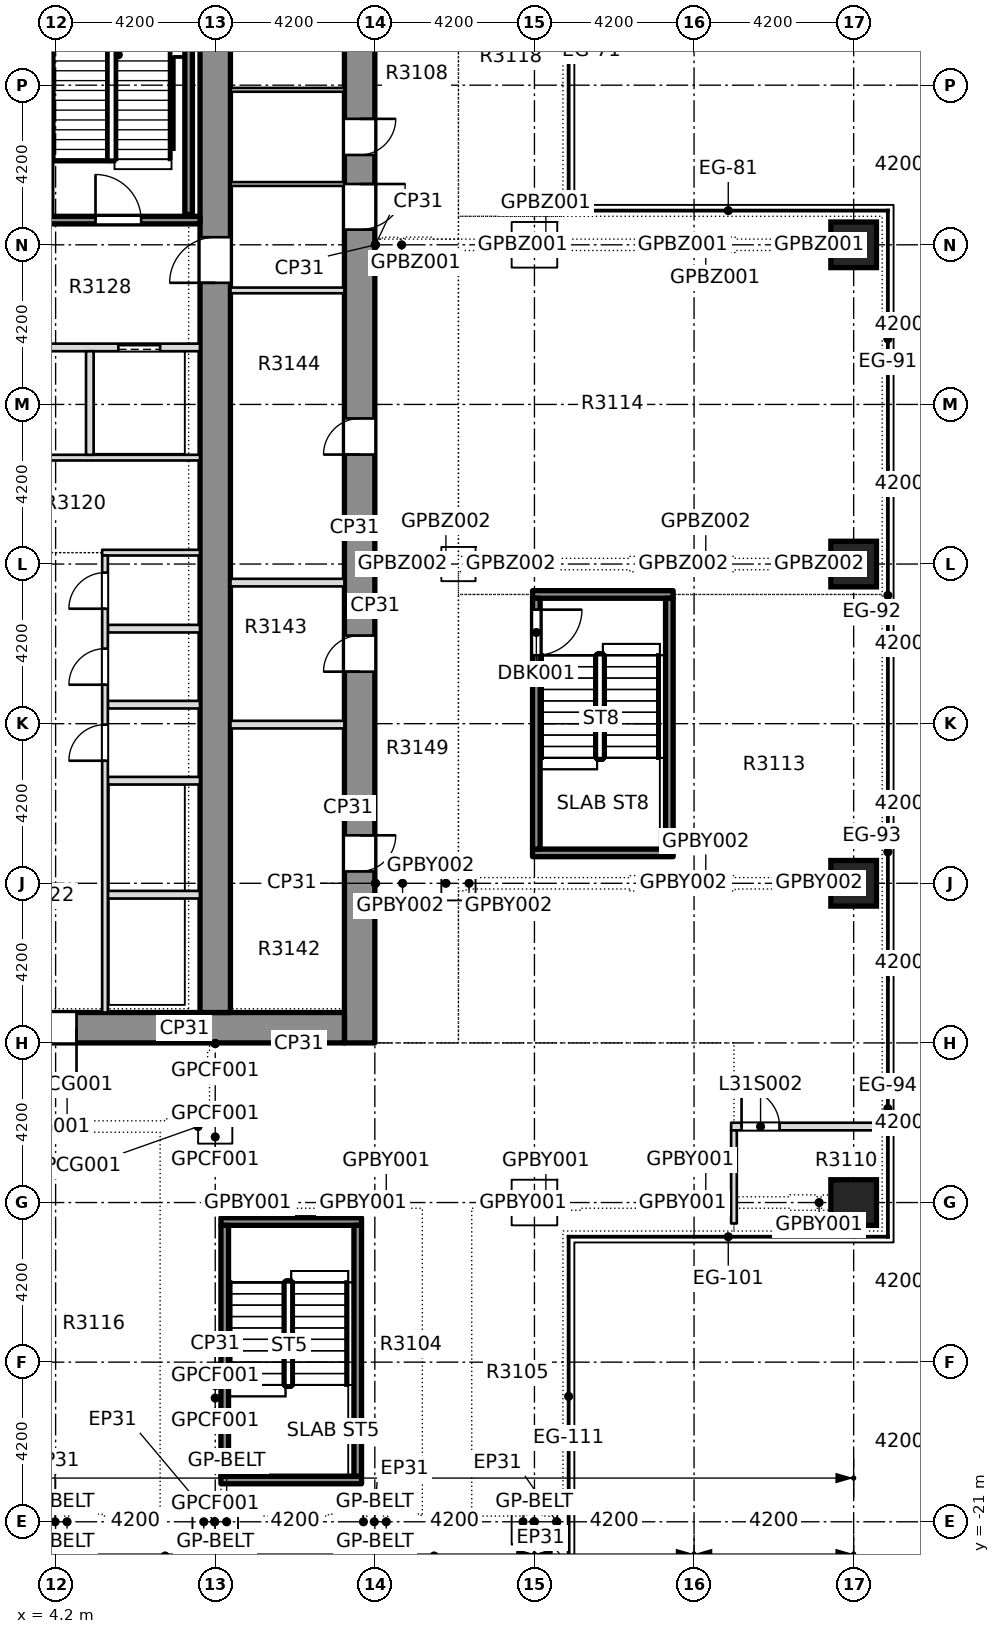
"""IFC4 building model, lengths in metres.
Left out: names, types, materials, properties, quantities, classifications, styles, units other than length and angle.
Written with IfcOpenShell. Run it as: python <this file> out.ifc"""

import sys

from ifc_helpers import new_model, si_unit, direction, frame, frame_2d, origin, origin_2d, place, context, subcontext, project, spatial, rectangle, extrude, element, fill, save


model = new_model("IFC4")
c1 = context("Model", 3, precision=1e-05, world=origin(), true_north=direction((0.0, 1.0)))
c2 = subcontext(c1, "Body", "Model", "MODEL_VIEW")
j1 = project(units=[si_unit("LENGTHUNIT", "METRE"), si_unit("PLANEANGLEUNIT", "RADIAN")], contexts=[c1])
p1 = place(None, origin())
s1 = spatial("IfcSite", under=j1, at=p1, CompositionType="ELEMENT")
p2 = place(p1, origin())
s2 = spatial("IfcBuilding", under=s1, at=p2, CompositionType="ELEMENT")
p3 = place(p2, frame((0.0, 0.0, 121.8)))
s3 = spatial("IfcBuildingStorey", under=s2, at=p3, CompositionType="ELEMENT", Elevation=121.8)
p4 = place(p3, frame((12.2, -8.4, 0.0), z_axis=(0.0, 0.0, 1.0), x_axis=(0.0, 1.0, 0.0)))
e1 = element("IfcWall", 1, at=p4, inside=s3, PredefinedType="SHEAR", context=c2, shape_type="SweptSolid", body=[
    extrude(rectangle(XDim=30.15, YDim=0.8, at=frame_2d((15.075, 0.0))), origin(), (0.0, 0.0, 1.0), 6.1),
])
p5 = place(p4, frame((4.512, 0.0, 0.0)))
e2 = element("IfcOpeningElement", 2, at=p5, cuts=e1, PredefinedType="OPENING", context=c2, shape_type="SweptSolid", body=[
    extrude(rectangle(XDim=0.95, YDim=2.1, at=frame_2d((0.475, 1.05))), frame((0.0, 0.41, 0.0), z_axis=(0.0, -1.0, 0.0), x_axis=(1.0, 0.0, 0.0)), (0.0, 0.0, 1.0), 0.82),
])
p6 = place(p4, frame((9.768, 0.0, 0.0)))
e3 = element("IfcOpeningElement", 3, at=p6, cuts=e1, PredefinedType="OPENING", context=c2, shape_type="SweptSolid", body=[
    extrude(rectangle(XDim=0.95, YDim=2.1, at=frame_2d((0.475, 1.05))), frame((0.0, 0.41, 0.0), z_axis=(0.0, -1.0, 0.0), x_axis=(1.0, 0.0, 0.0)), (0.0, 0.0, 1.0), 0.82),
])
p7 = place(p4, frame((15.481, 0.0, 0.0)))
e4 = element("IfcOpeningElement", 4, at=p7, cuts=e1, PredefinedType="OPENING", context=c2, shape_type="SweptSolid", body=[
    extrude(rectangle(XDim=0.95, YDim=2.1, at=frame_2d((0.475, 1.05))), frame((0.0, 0.41, 0.0), z_axis=(0.0, -1.0, 0.0), x_axis=(1.0, 0.0, 0.0)), (0.0, 0.0, 1.0), 0.82),
])
p8 = place(p4, frame((23.364, 0.0, 0.0)))
e5 = element("IfcOpeningElement", 5, at=p8, cuts=e1, PredefinedType="OPENING", context=c2, shape_type="SweptSolid", body=[
    extrude(rectangle(XDim=0.95, YDim=2.1, at=frame_2d((0.475, 1.05))), frame((0.0, 0.41, 0.0), z_axis=(0.0, -1.0, 0.0), x_axis=(1.0, 0.0, 0.0)), (0.0, 0.0, 1.0), 0.82),
])
p9 = place(p4, frame((26.689, 0.0, 0.0)))
e6 = element("IfcOpeningElement", 6, at=p9, cuts=e1, PredefinedType="OPENING", context=c2, shape_type="SweptSolid", body=[
    extrude(rectangle(XDim=0.95, YDim=2.1, at=frame_2d((0.475, 1.05))), frame((0.0, 0.41, 0.0), z_axis=(0.0, -1.0, 0.0), x_axis=(1.0, 0.0, 0.0)), (0.0, 0.0, 1.0), 0.82),
])
p10 = place(p4, frame((21.4, 0.0, 0.0)))
e7 = element("IfcOpeningElement", 7, at=p10, cuts=e1, PredefinedType="OPENING", context=c2, shape_type="SweptSolid", body=[
    extrude(rectangle(XDim=1.2, YDim=2.1, at=frame_2d((0.6, 1.05))), frame((0.0, 0.41, 0.0), z_axis=(0.0, -1.0, 0.0), x_axis=(1.0, 0.0, 0.0)), (0.0, 0.0, 1.0), 0.82),
])
p11 = place(p3, frame((-11.8, -8.0, 0.0), z_axis=(0.0, 0.0, 1.0), x_axis=(1.0, 0.0, 0.0)))
e8 = element("IfcWall", 8, at=p11, inside=s3, PredefinedType="SHEAR", context=c2, shape_type="SweptSolid", body=[
    extrude(rectangle(XDim=23.6, YDim=0.8, at=frame_2d((11.8, 0.0))), origin(), (0.0, 0.0, 1.0), 6.1),
])
p12 = place(p11, frame((7.05, 0.0, 0.0)))
e9 = element("IfcOpeningElement", 9, at=p12, cuts=e8, PredefinedType="OPENING", context=c2, shape_type="SweptSolid", body=[
    extrude(rectangle(XDim=1.8, YDim=2.1, at=frame_2d((0.9, 1.05))), frame((0.0, 0.41, 0.0), z_axis=(0.0, -1.0, 0.0), x_axis=(1.0, 0.0, 0.0)), (0.0, 0.0, 1.0), 0.82),
])
p13 = place(p11, frame((14.75, 0.0, 0.0)))
e10 = element("IfcOpeningElement", 10, at=p13, cuts=e8, PredefinedType="OPENING", context=c2, shape_type="SweptSolid", body=[
    extrude(rectangle(XDim=1.8, YDim=2.1, at=frame_2d((0.9, 1.05))), frame((0.0, 0.41, 0.0), z_axis=(0.0, -1.0, 0.0), x_axis=(1.0, 0.0, 0.0)), (0.0, 0.0, 1.0), 0.82),
])
p14 = place(p3, frame((8.4, -7.6, 0.0), z_axis=(0.0, 0.0, 1.0), x_axis=(0.0, 1.0, 0.0)))
e11 = element("IfcWall", 11, at=p14, inside=s3, PredefinedType="SHEAR", context=c2, shape_type="SweptSolid", body=[
    extrude(rectangle(XDim=28.55, YDim=0.8, at=frame_2d((14.275, 0.0))), origin(), (0.0, 0.0, 1.0), 6.1),
])
p15 = place(p14, frame((19.2, 0.0, 0.0)))
e12 = element("IfcOpeningElement", 12, at=p15, cuts=e11, PredefinedType="OPENING", context=c2, shape_type="SweptSolid", body=[
    extrude(rectangle(XDim=1.2, YDim=2.1, at=frame_2d((0.6, 1.05))), frame((0.0, 0.41, 0.0), z_axis=(0.0, -1.0, 0.0), x_axis=(1.0, 0.0, 0.0)), (0.0, 0.0, 1.0), 0.82),
])
for number, where, z_axis, x_axis in (
    (13, (25.2, -12.6, -0.45), (0.0, 0.0, 1.0), (1.0, 0.0, 0.0)),
    (14, (25.2, -4.2, -0.45), (0.0, 0.0, 1.0), (1.0, 0.0, 0.0)),
    (15, (25.2, 4.2, -0.45), (0.0, 0.0, 1.0), (1.0, 0.0, 0.0)),
    (16, (25.2, 12.6, -0.45), (0.0, 0.0, 1.0), (1.0, 0.0, 0.0)),
):
    element("IfcColumn", number, at=place(p3, frame(where, z_axis=z_axis, x_axis=x_axis)), inside=s3, PredefinedType="COLUMN", context=c2, shape_type="SweptSolid", body=[
        extrude(rectangle(XDim=1.2, YDim=1.2, at=origin_2d()), origin(), (0.0, 0.0, 1.0), 6.55),
    ])
p16 = place(p3, frame((21.975, -10.6, 0.0), z_axis=(0.0, 0.0, 1.0), x_axis=(1.0, 0.0, 0.0)))
e17 = element("IfcWall", 17, at=p16, inside=s3, PredefinedType="PARTITIONING", context=c2, shape_type="SweptSolid", body=[
    extrude(rectangle(XDim=3.775, YDim=0.2, at=frame_2d((1.887, 0.0))), origin(), (0.0, 0.0, 1.0), 6.1),
])
p17 = place(p16, frame((0.275, 0.0, 0.0)))
e18 = element("IfcOpeningElement", 18, at=p17, cuts=e17, PredefinedType="OPENING", context=c2, shape_type="SweptSolid", body=[
    extrude(rectangle(XDim=1.0, YDim=2.1, at=frame_2d((0.5, 1.05))), frame((0.0, 0.11, 0.0), z_axis=(0.0, -1.0, 0.0), x_axis=(1.0, 0.0, 0.0)), (0.0, 0.0, 1.0), 0.22),
])
p18 = place(p3, frame((22.05, -13.15, 0.0), z_axis=(0.0, 0.0, 1.0), x_axis=(0.0, 1.0, 0.0)))
e19 = element("IfcWall", 19, at=p18, inside=s3, PredefinedType="PARTITIONING", context=c2, shape_type="SweptSolid", body=[
    extrude(rectangle(XDim=2.45, YDim=0.15, at=frame_2d((1.225, 0.0))), origin(), (0.0, 0.0, 1.0), 6.1),
])
for number, where, z_axis, x_axis in (
    (20, (5.575, -4.5, 0.0), (0.0, 0.0, 1.0), (1.0, 0.0, 0.0)),
    (21, (5.575, -1.5, 0.0), (0.0, 0.0, 1.0), (1.0, 0.0, 0.0)),
    (22, (5.575, 0.5, 0.0), (0.0, 0.0, 1.0), (1.0, 0.0, 0.0)),
    (23, (5.575, 2.5, 0.0), (0.0, 0.0, 1.0), (1.0, 0.0, 0.0)),
):
    element("IfcWall", number, at=place(p3, frame(where, z_axis=z_axis, x_axis=x_axis)), inside=s3, PredefinedType="PARTITIONING", context=c2, shape_type="SweptSolid", body=[
        extrude(rectangle(XDim=2.424, YDim=0.2, at=frame_2d((1.212, 0.0))), origin(), (0.0, 0.0, 1.0), 6.1),
    ])
p19 = place(p3, frame((5.425, 4.5, 0.0), z_axis=(0.0, 0.0, 1.0), x_axis=(1.0, 0.0, 0.0)))
e24 = element("IfcWall", 24, at=p19, inside=s3, PredefinedType="PARTITIONING", context=c2, shape_type="SweptSolid", body=[
    extrude(rectangle(XDim=2.574, YDim=0.15, at=frame_2d((1.287, 0.0))), origin(), (0.0, 0.0, 1.0), 6.1),
])
p20 = place(p3, frame((-7.999, 7.0, 0.0), z_axis=(0.0, 0.0, 1.0), x_axis=(1.0, 0.0, 0.0)))
e25 = element("IfcWall", 25, at=p20, inside=s3, PredefinedType="PARTITIONING", context=c2, shape_type="SweptSolid", body=[
    extrude(rectangle(XDim=15.998, YDim=0.15, at=frame_2d((7.999, 0.0))), origin(), (0.0, 0.0, 1.0), 6.1),
])
p21 = place(p20, frame((7.299, 0.0, 0.0)))
e26 = element("IfcOpeningElement", 26, at=p21, cuts=e25, PredefinedType="OPENING", context=c2, shape_type="SweptSolid", body=[
    extrude(rectangle(XDim=1.4, YDim=2.1, at=frame_2d((0.7, 1.05))), frame((0.0, 0.085, 0.0), z_axis=(0.0, -1.0, 0.0), x_axis=(1.0, 0.0, 0.0)), (0.0, 0.0, 1.0), 0.17),
])
p22 = place(p3, frame((3.6, 9.9, 0.0), z_axis=(0.0, 0.0, 1.0), x_axis=(1.0, 0.0, 0.0)))
e27 = element("IfcWall", 27, at=p22, inside=s3, PredefinedType="PARTITIONING", context=c2, shape_type="SweptSolid", body=[
    extrude(rectangle(XDim=4.399, YDim=0.2, at=frame_2d((2.199, 0.0))), origin(), (0.0, 0.0, 1.0), 6.1),
])
p23 = place(p22, frame((2.25, 0.0, 0.0)))
e28 = element("IfcOpeningElement", 28, at=p23, cuts=e27, PredefinedType="OPENING", context=c2, shape_type="SweptSolid", body=[
    extrude(rectangle(XDim=1.1, YDim=2.1, at=frame_2d((0.55, 1.05))), frame((0.0, 0.11, 0.0), z_axis=(0.0, -1.0, 0.0), x_axis=(1.0, 0.0, 0.0)), (0.0, 0.0, 1.0), 0.22),
])
p24 = place(p3, frame((3.425, 13.25, 0.0), z_axis=(0.0, 0.0, 1.0), x_axis=(1.0, 0.0, 0.0)))
e29 = element("IfcWall", 29, at=p24, inside=s3, PredefinedType="SOLIDWALL", context=c2, shape_type="SweptSolid", body=[
    extrude(rectangle(XDim=4.574, YDim=0.2, at=frame_2d((2.287, 0.0))), origin(), (0.0, 0.0, 1.0), 6.1),
])
p25 = place(p24, frame((1.825, 0.0, 0.0)))
e30 = element("IfcOpeningElement", 30, at=p25, cuts=e29, PredefinedType="OPENING", context=c2, shape_type="SweptSolid", body=[
    extrude(rectangle(XDim=1.2, YDim=2.1, at=frame_2d((0.6, 1.05))), frame((0.0, 0.11, 0.0), z_axis=(0.0, -1.0, 0.0), x_axis=(1.0, 0.0, 0.0)), (0.0, 0.0, 1.0), 0.22),
])
p26 = place(p3, frame((5.1, 7.075, 0.0), z_axis=(0.0, 0.0, 1.0), x_axis=(0.0, 1.0, 0.0)))
e31 = element("IfcWall", 31, at=p26, inside=s3, PredefinedType="PARTITIONING", context=c2, shape_type="SweptSolid", body=[
    extrude(rectangle(XDim=2.725, YDim=0.2, at=frame_2d((1.363, 0.0))), origin(), (0.0, 0.0, 1.0), 6.1),
])
p27 = place(p3, frame((5.5, -7.599, 0.0), z_axis=(0.0, 0.0, 1.0), x_axis=(0.0, 1.0, 0.0)))
e32 = element("IfcWall", 32, at=p27, inside=s3, PredefinedType="PARTITIONING", context=c2, shape_type="SweptSolid", body=[
    extrude(rectangle(XDim=12.024, YDim=0.15, at=frame_2d((6.012, 0.0))), origin(), (0.0, 0.0, 1.0), 6.1),
])
p28 = place(p27, frame((6.624, 0.0, 0.0)))
e33 = element("IfcOpeningElement", 33, at=p28, cuts=e32, PredefinedType="OPENING", context=c2, shape_type="SweptSolid", body=[
    extrude(rectangle(XDim=0.95, YDim=2.1, at=frame_2d((0.475, 1.05))), frame((0.0, 0.085, 0.0), z_axis=(0.0, -1.0, 0.0), x_axis=(1.0, 0.0, 0.0)), (0.0, 0.0, 1.0), 0.17),
])
p29 = place(p27, frame((8.624, 0.0, 0.0)))
e34 = element("IfcOpeningElement", 34, at=p29, cuts=e32, PredefinedType="OPENING", context=c2, shape_type="SweptSolid", body=[
    extrude(rectangle(XDim=0.95, YDim=2.1, at=frame_2d((0.475, 1.05))), frame((0.0, 0.085, 0.0), z_axis=(0.0, -1.0, 0.0), x_axis=(1.0, 0.0, 0.0)), (0.0, 0.0, 1.0), 0.17),
])
p30 = place(p27, frame((10.624, 0.0, 0.0)))
e35 = element("IfcOpeningElement", 35, at=p30, cuts=e32, PredefinedType="OPENING", context=c2, shape_type="SweptSolid", body=[
    extrude(rectangle(XDim=0.95, YDim=2.1, at=frame_2d((0.475, 1.05))), frame((0.0, 0.085, 0.0), z_axis=(0.0, -1.0, 0.0), x_axis=(1.0, 0.0, 0.0)), (0.0, 0.0, 1.0), 0.17),
])
for number, where, z_axis, x_axis in (
    (36, (8.801, -0.025, 0.0), (0.0, 0.0, 1.0), (1.0, 0.0, 0.0)),
    (37, (8.801, 3.712, 0.0), (0.0, 0.0, 1.0), (1.0, 0.0, 0.0)),
):
    element("IfcWall", number, at=place(p3, frame(where, z_axis=z_axis, x_axis=x_axis)), inside=s3, PredefinedType="PARTITIONING", context=c2, shape_type="SweptSolid", body=[
        extrude(rectangle(XDim=2.998, YDim=0.2, at=frame_2d((1.499, 0.0))), origin(), (0.0, 0.0, 1.0), 6.1),
    ])
p31 = place(p3, frame((8.801, 11.4, 0.0), z_axis=(0.0, 0.0, 1.0), x_axis=(1.0, 0.0, 0.0)))
e38 = element("IfcWall", 38, at=p31, inside=s3, PredefinedType="PARTITIONING", context=c2, shape_type="SweptSolid", body=[
    extrude(rectangle(XDim=2.998, YDim=0.15, at=frame_2d((1.499, 0.0))), origin(), (0.0, 0.0, 1.0), 6.1),
])
for number, where, z_axis, x_axis in (
    (39, (8.801, 14.2, 0.0), (0.0, 0.0, 1.0), (1.0, 0.0, 0.0)),
    (40, (8.801, 16.678, 0.0), (0.0, 0.0, 1.0), (1.0, 0.0, 0.0)),
):
    element("IfcWall", number, at=place(p3, frame(where, z_axis=z_axis, x_axis=x_axis)), inside=s3, PredefinedType="PARTITIONING", context=c2, shape_type="SweptSolid", body=[
        extrude(rectangle(XDim=2.998, YDim=0.1, at=frame_2d((1.499, 0.0))), origin(), (0.0, 0.0, 1.0), 6.1),
    ])
for number, where, z_axis, x_axis in (
    (41, (8.55, -19.9, 0.0), (0.0, 0.0, 1.0), (1.0, 0.0, 0.0)),
    (42, (8.55, -13.1, 0.0), (0.0, 0.0, 1.0), (1.0, 0.0, 0.0)),
):
    element("IfcWall", number, at=place(p3, frame(where, z_axis=z_axis, x_axis=x_axis)), inside=s3, PredefinedType="SOLIDWALL", context=c2, shape_type="SweptSolid", body=[
        extrude(rectangle(XDim=3.7, YDim=0.2, at=frame_2d((1.85, 0.0))), origin(), (0.0, 0.0, 1.0), 6.1),
    ])
for number, where, z_axis, x_axis in (
    (43, (8.65, -19.8, 0.0), (0.0, 0.0, 1.0), (0.0, 1.0, 0.0)),
    (44, (12.15, -19.8, 0.0), (0.0, 0.0, 1.0), (0.0, 1.0, 0.0)),
):
    element("IfcWall", number, at=place(p3, frame(where, z_axis=z_axis, x_axis=x_axis)), inside=s3, PredefinedType="SOLIDWALL", context=c2, shape_type="SweptSolid", body=[
        extrude(rectangle(XDim=6.6, YDim=0.2, at=frame_2d((3.3, 0.0))), origin(), (0.0, 0.0, 1.0), 6.1),
    ])
for number, where, z_axis, x_axis in (
    (45, (16.75, -3.4, 0.0), (0.0, 0.0, 1.0), (1.0, 0.0, 0.0)),
    (46, (16.75, 3.4, 0.0), (0.0, 0.0, 1.0), (1.0, 0.0, 0.0)),
):
    element("IfcWall", number, at=place(p3, frame(where, z_axis=z_axis, x_axis=x_axis)), inside=s3, PredefinedType="SOLIDWALL", context=c2, shape_type="SweptSolid", body=[
        extrude(rectangle(XDim=3.7, YDim=0.2, at=frame_2d((1.85, 0.0))), origin(), (0.0, 0.0, 1.0), 6.1),
    ])
p32 = place(p3, frame((16.85, -3.3, 0.0), z_axis=(0.0, 0.0, 1.0), x_axis=(0.0, 1.0, 0.0)))
e47 = element("IfcWall", 47, at=p32, inside=s3, PredefinedType="SOLIDWALL", context=c2, shape_type="SweptSolid", body=[
    extrude(rectangle(XDim=6.6, YDim=0.2, at=frame_2d((3.3, 0.0))), origin(), (0.0, 0.0, 1.0), 6.1),
])
p33 = place(p32, frame((5.1, 0.0, 0.0)))
e48 = element("IfcOpeningElement", 48, at=p33, cuts=e47, PredefinedType="OPENING", context=c2, shape_type="SweptSolid", body=[
    extrude(rectangle(XDim=1.2, YDim=2.1, at=frame_2d((0.6, 1.05))), frame((0.0, 0.11, 0.0), z_axis=(0.0, -1.0, 0.0), x_axis=(1.0, 0.0, 0.0)), (0.0, 0.0, 1.0), 0.22),
])
p34 = place(p3, frame((20.35, -3.3, 0.0), z_axis=(0.0, 0.0, 1.0), x_axis=(0.0, 1.0, 0.0)))
e49 = element("IfcWall", 49, at=p34, inside=s3, PredefinedType="SOLIDWALL", context=c2, shape_type="SweptSolid", body=[
    extrude(rectangle(XDim=6.6, YDim=0.2, at=frame_2d((3.3, 0.0))), origin(), (0.0, 0.0, 1.0), 6.1),
])
p35 = place(p3, frame((7.7, 13.4, 0.0), z_axis=(0.0, 0.0, 1.0), x_axis=(0.0, 1.0, 0.0)))
e50 = element("IfcWall", 50, at=p35, inside=s3, PredefinedType="SOLIDWALL", context=c2, shape_type="SweptSolid", body=[
    extrude(rectangle(XDim=7.45, YDim=0.2, at=frame_2d((3.725, 0.0))), origin(), (0.0, 0.0, 1.0), 6.1),
])
p36 = place(p17, origin())
e51 = element("IfcDoor", 51, at=p36, inside=s3, OperationType="SINGLE_SWING_RIGHT", PredefinedType="DOOR", context=c2, shape_type="SweptSolid", body=[
    extrude(rectangle(XDim=1.0, YDim=2.1, at=frame_2d((0.5, 1.05))), frame((0.0, 0.025, 0.0), z_axis=(0.0, -1.0, 0.0), x_axis=(1.0, 0.0, 0.0)), (0.0, 0.0, 1.0), 0.05),
])
fill(e18, e51)
p37 = place(p28, origin())
e52 = element("IfcDoor", 52, at=p37, inside=s3, OperationType="SINGLE_SWING_RIGHT", PredefinedType="DOOR", context=c2, shape_type="SweptSolid", body=[
    extrude(rectangle(XDim=0.95, YDim=2.1, at=frame_2d((0.475, 1.05))), frame((0.0, 0.025, 0.0), z_axis=(0.0, -1.0, 0.0), x_axis=(1.0, 0.0, 0.0)), (0.0, 0.0, 1.0), 0.05),
])
fill(e33, e52)
p38 = place(p29, origin())
e53 = element("IfcDoor", 53, at=p38, inside=s3, OperationType="SINGLE_SWING_LEFT", PredefinedType="DOOR", context=c2, shape_type="SweptSolid", body=[
    extrude(rectangle(XDim=0.95, YDim=2.1, at=frame_2d((0.475, 1.05))), frame((0.0, 0.025, 0.0), z_axis=(0.0, -1.0, 0.0), x_axis=(1.0, 0.0, 0.0)), (0.0, 0.0, 1.0), 0.05),
])
fill(e34, e53)
p39 = place(p30, origin())
e54 = element("IfcDoor", 54, at=p39, inside=s3, OperationType="SINGLE_SWING_RIGHT", PredefinedType="DOOR", context=c2, shape_type="SweptSolid", body=[
    extrude(rectangle(XDim=0.95, YDim=2.1, at=frame_2d((0.475, 1.05))), frame((0.0, 0.025, 0.0), z_axis=(0.0, -1.0, 0.0), x_axis=(1.0, 0.0, 0.0)), (0.0, 0.0, 1.0), 0.05),
])
fill(e35, e54)
p40 = place(p25, origin())
e55 = element("IfcDoor", 55, at=p40, inside=s3, OperationType="SINGLE_SWING_RIGHT", PredefinedType="DOOR", context=c2, shape_type="SweptSolid", body=[
    extrude(rectangle(XDim=1.2, YDim=2.1, at=frame_2d((0.6, 1.05))), frame((0.0, 0.025, 0.0), z_axis=(0.0, -1.0, 0.0), x_axis=(1.0, 0.0, 0.0)), (0.0, 0.0, 1.0), 0.05),
])
fill(e30, e55)
p41 = place(p23, origin())
e56 = element("IfcDoor", 56, at=p41, inside=s3, OperationType="SLIDING_TO_LEFT", PredefinedType="DOOR", context=c2, shape_type="SweptSolid", body=[
    extrude(rectangle(XDim=1.1, YDim=2.1, at=frame_2d((0.55, 1.05))), frame((0.0, 0.025, 0.0), z_axis=(0.0, -1.0, 0.0), x_axis=(1.0, 0.0, 0.0)), (0.0, 0.0, 1.0), 0.05),
])
fill(e28, e56)
p42 = place(p13, origin())
e57 = element("IfcDoor", 57, at=p42, inside=s3, OperationType="SINGLE_SWING_LEFT", PredefinedType="DOOR", context=c2, shape_type="SweptSolid", body=[
    extrude(rectangle(XDim=1.8, YDim=2.1, at=frame_2d((0.9, 1.05))), frame((0.0, 0.025, 0.0), z_axis=(0.0, -1.0, 0.0), x_axis=(1.0, 0.0, 0.0)), (0.0, 0.0, 1.0), 0.05),
])
fill(e10, e57)
p43 = place(p5, origin())
e58 = element("IfcDoor", 58, at=p43, inside=s3, OperationType="SINGLE_SWING_LEFT", PredefinedType="DOOR", context=c2, shape_type="SweptSolid", body=[
    extrude(rectangle(XDim=0.95, YDim=2.1, at=frame_2d((0.475, 1.05))), frame((0.0, 0.025, 0.0), z_axis=(0.0, -1.0, 0.0), x_axis=(1.0, 0.0, 0.0)), (0.0, 0.0, 1.0), 0.05),
])
fill(e2, e58)
p44 = place(p6, origin())
e59 = element("IfcDoor", 59, at=p44, inside=s3, OperationType="SINGLE_SWING_LEFT", PredefinedType="DOOR", context=c2, shape_type="SweptSolid", body=[
    extrude(rectangle(XDim=0.95, YDim=2.1, at=frame_2d((0.475, 1.05))), frame((0.0, 0.025, 0.0), z_axis=(0.0, -1.0, 0.0), x_axis=(1.0, 0.0, 0.0)), (0.0, 0.0, 1.0), 0.05),
])
fill(e3, e59)
p45 = place(p7, origin())
e60 = element("IfcDoor", 60, at=p45, inside=s3, OperationType="SINGLE_SWING_LEFT", PredefinedType="DOOR", context=c2, shape_type="SweptSolid", body=[
    extrude(rectangle(XDim=0.95, YDim=2.1, at=frame_2d((0.475, 1.05))), frame((0.0, 0.025, 0.0), z_axis=(0.0, -1.0, 0.0), x_axis=(1.0, 0.0, 0.0)), (0.0, 0.0, 1.0), 0.05),
])
fill(e4, e60)
p46 = place(p8, origin())
e61 = element("IfcDoor", 61, at=p46, inside=s3, OperationType="SINGLE_SWING_LEFT", PredefinedType="DOOR", context=c2, shape_type="SweptSolid", body=[
    extrude(rectangle(XDim=0.95, YDim=2.1, at=frame_2d((0.475, 1.05))), frame((0.0, 0.025, 0.0), z_axis=(0.0, -1.0, 0.0), x_axis=(1.0, 0.0, 0.0)), (0.0, 0.0, 1.0), 0.05),
])
fill(e5, e61)
p47 = place(p10, origin())
e62 = element("IfcDoor", 62, at=p47, inside=s3, OperationType="SINGLE_SWING_LEFT", PredefinedType="DOOR", context=c2, shape_type="SweptSolid", body=[
    extrude(rectangle(XDim=1.2, YDim=2.1, at=frame_2d((0.6, 1.05))), frame((0.0, 0.025, 0.0), z_axis=(0.0, -1.0, 0.0), x_axis=(1.0, 0.0, 0.0)), (0.0, 0.0, 1.0), 0.05),
])
fill(e7, e62)
p48 = place(p15, origin())
e63 = element("IfcDoor", 63, at=p48, inside=s3, OperationType="SINGLE_SWING_LEFT", PredefinedType="DOOR", context=c2, shape_type="SweptSolid", body=[
    extrude(rectangle(XDim=1.2, YDim=2.1, at=frame_2d((0.6, 1.05))), frame((0.0, 0.025, 0.0), z_axis=(0.0, -1.0, 0.0), x_axis=(1.0, 0.0, 0.0)), (0.0, 0.0, 1.0), 0.05),
])
fill(e12, e63)
p49 = place(p33, origin())
e64 = element("IfcDoor", 64, at=p49, inside=s3, OperationType="SINGLE_SWING_LEFT", PredefinedType="DOOR", context=c2, shape_type="SweptSolid", body=[
    extrude(rectangle(XDim=1.2, YDim=2.1, at=frame_2d((0.6, 1.05))), frame((0.0, 0.025, 0.0), z_axis=(0.0, -1.0, 0.0), x_axis=(1.0, 0.0, 0.0)), (0.0, 0.0, 1.0), 0.05),
])
fill(e48, e64)
save(model, sys.argv[1])
